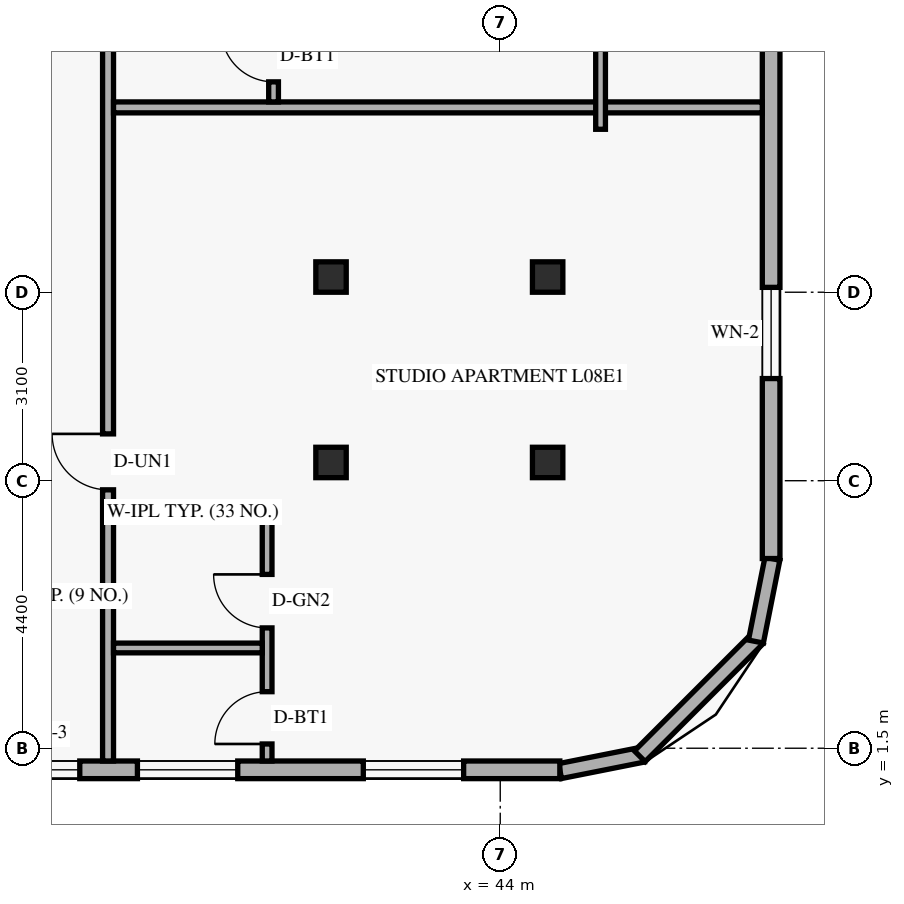
"""IFC4 building model, lengths in metres.
Left out: names, types, materials, properties, quantities, classifications, styles, units other than length and angle.
Written with IfcOpenShell. Run it as: python <this file> out.ifc"""

import sys

from ifc_helpers import new_model, si_unit, direction, frame, frame_2d, origin, origin_2d, place, context, subcontext, project, spatial, rectangle, hollow_rectangle, extrude, element, fill, save


model = new_model("IFC4")
c1 = context("Model", 3, precision=1e-05, world=origin(), true_north=direction((0.0, 1.0)))
c2 = subcontext(c1, "Body", "Model", "MODEL_VIEW")
j1 = project(units=[si_unit("LENGTHUNIT", "METRE"), si_unit("PLANEANGLEUNIT", "RADIAN")], contexts=[c1])
p1 = place(None, origin())
s1 = spatial("IfcSite", under=j1, at=p1, CompositionType="ELEMENT")
p2 = place(p1, origin())
s2 = spatial("IfcBuilding", under=s1, at=p2, CompositionType="ELEMENT")
p3 = place(p2, frame((0.0, 0.0, 34.8)))
s3 = spatial("IfcBuildingStorey", under=s2, at=p3, CompositionType="ELEMENT", Elevation=34.8)
for number, where, z_axis, x_axis in (
    (1, (41.154, 6.2, 0.0), (0.035, 0.0, 0.999), (0.0, 1.0, 0.0)),
    (2, (41.154, 9.25, 0.0), (0.035, 0.0, 0.999), (0.0, 1.0, 0.0)),
):
    element("IfcColumn", number, at=place(p3, frame(where, z_axis=z_axis, x_axis=x_axis)), inside=s3, PredefinedType="COLUMN", context=c2, shape_type="SweptSolid", body=[
        extrude(hollow_rectangle(XDim=0.5, YDim=0.5, WallThickness=0.022, at=origin_2d()), origin(), (0.0, 0.0, 1.0), 3.602),
    ])
for number, where, z_axis, x_axis in (
    (3, (44.675, 6.2, 0.0), (0.058, 0.0, 0.998), (0.0, 1.0, 0.0)),
    (4, (44.675, 9.25, 0.0), (0.058, 0.0, 0.998), (0.0, 1.0, 0.0)),
):
    element("IfcColumn", number, at=place(p3, frame(where, z_axis=z_axis, x_axis=x_axis)), inside=s3, PredefinedType="COLUMN", context=c2, shape_type="SweptSolid", body=[
        extrude(hollow_rectangle(XDim=0.5, YDim=0.5, WallThickness=0.022, at=origin_2d()), origin(), (0.0, 0.0, 1.0), 3.606),
    ])
p4 = place(p3, frame((44.983, 1.124, 0.0), z_axis=(0.0, 0.0, 1.0), x_axis=(0.980809899341, 0.19496651342, 0.0)))
e5 = element("IfcWall", 5, at=p4, inside=s3, PredefinedType="SOLIDWALL", context=c2, shape_type="SweptSolid", body=[
    extrude(rectangle(XDim=1.389, YDim=0.25, at=frame_2d((0.694, 0.0))), origin(), (0.0, 0.0, 1.0), 3.36),
])
p5 = place(p3, frame((46.295, 1.368, 0.0), z_axis=(0.0, 0.0, 1.0), x_axis=(0.707106781187, 0.707106781187, 0.0)))
e6 = element("IfcWall", 6, at=p5, inside=s3, PredefinedType="SOLIDWALL", context=c2, shape_type="SweptSolid", body=[
    extrude(rectangle(XDim=2.739, YDim=0.25, at=frame_2d((1.37, 0.0))), origin(), (0.0, 0.0, 1.0), 3.36),
])
p6 = place(p3, frame((48.205, 3.254, 0.0), z_axis=(0.0, 0.0, 1.0), x_axis=(0.19496651342, 0.980809899341, 0.0)))
e7 = element("IfcWall", 7, at=p6, inside=s3, PredefinedType="SOLIDWALL", context=c2, shape_type="SweptSolid", body=[
    extrude(rectangle(XDim=1.389, YDim=0.25, at=frame_2d((0.694, 0.0))), origin(), (0.0, 0.0, 1.0), 3.36),
])
p7 = place(p3, frame((5.42, 1.145, 0.0), z_axis=(0.0, 0.0, 1.0), x_axis=(1.0, 0.0, 0.0)))
e8 = element("IfcWall", 8, at=p7, inside=s3, PredefinedType="SOLIDWALL", context=c2, shape_type="SweptSolid", body=[
    extrude(rectangle(XDim=39.56, YDim=0.29, at=frame_2d((19.78, 0.0))), origin(), (0.0, 0.0, 1.0), 3.36),
])
p8 = place(p7, frame((2.615, 0.0, 0.85)))
e9 = element("IfcOpeningElement", 9, at=p8, cuts=e8, PredefinedType="OPENING", context=c2, shape_type="SweptSolid", body=[
    extrude(rectangle(XDim=1.65, YDim=1.6, at=frame_2d((0.825, 0.8))), frame((0.0, 0.155, 0.0), z_axis=(0.0, -1.0, 0.0), x_axis=(1.0, 0.0, 0.0)), (0.0, 0.0, 1.0), 0.31),
])
p9 = place(p7, frame((7.18, 0.0, 0.85)))
e10 = element("IfcOpeningElement", 10, at=p9, cuts=e8, PredefinedType="OPENING", context=c2, shape_type="SweptSolid", body=[
    extrude(rectangle(XDim=1.2, YDim=1.5, at=frame_2d((0.6, 0.75))), frame((0.0, 0.155, 0.0), z_axis=(0.0, -1.0, 0.0), x_axis=(1.0, 0.0, 0.0)), (0.0, 0.0, 1.0), 0.31),
])
p10 = place(p7, frame((11.906, 0.0, 0.85)))
e11 = element("IfcOpeningElement", 11, at=p10, cuts=e8, PredefinedType="OPENING", context=c2, shape_type="SweptSolid", body=[
    extrude(rectangle(XDim=1.65, YDim=1.6, at=frame_2d((0.825, 0.8))), frame((0.0, 0.155, 0.0), z_axis=(0.0, -1.0, 0.0), x_axis=(1.0, 0.0, 0.0)), (0.0, 0.0, 1.0), 0.31),
])
p11 = place(p7, frame((18.515, 0.0, 0.85)))
e12 = element("IfcOpeningElement", 12, at=p11, cuts=e8, PredefinedType="OPENING", context=c2, shape_type="SweptSolid", body=[
    extrude(rectangle(XDim=1.65, YDim=1.6, at=frame_2d((0.825, 0.8))), frame((0.0, 0.155, 0.0), z_axis=(0.0, -1.0, 0.0), x_axis=(1.0, 0.0, 0.0)), (0.0, 0.0, 1.0), 0.31),
])
p12 = place(p7, frame((25.124, 0.0, 0.85)))
e13 = element("IfcOpeningElement", 13, at=p12, cuts=e8, PredefinedType="OPENING", context=c2, shape_type="SweptSolid", body=[
    extrude(rectangle(XDim=1.65, YDim=1.6, at=frame_2d((0.825, 0.8))), frame((0.0, 0.155, 0.0), z_axis=(0.0, -1.0, 0.0), x_axis=(1.0, 0.0, 0.0)), (0.0, 0.0, 1.0), 0.31),
])
p13 = place(p7, frame((30.465, 0.0, 0.85)))
e14 = element("IfcOpeningElement", 14, at=p13, cuts=e8, PredefinedType="OPENING", context=c2, shape_type="SweptSolid", body=[
    extrude(rectangle(XDim=1.2, YDim=1.5, at=frame_2d((0.6, 0.75))), frame((0.0, 0.155, 0.0), z_axis=(0.0, -1.0, 0.0), x_axis=(1.0, 0.0, 0.0)), (0.0, 0.0, 1.0), 0.31),
])
p14 = place(p7, frame((32.613, 0.0, 0.85)))
e15 = element("IfcOpeningElement", 15, at=p14, cuts=e8, PredefinedType="OPENING", context=c2, shape_type="SweptSolid", body=[
    extrude(rectangle(XDim=1.65, YDim=1.6, at=frame_2d((0.825, 0.8))), frame((0.0, 0.155, 0.0), z_axis=(0.0, -1.0, 0.0), x_axis=(1.0, 0.0, 0.0)), (0.0, 0.0, 1.0), 0.31),
])
p15 = place(p7, frame((36.328, 0.0, 0.85)))
e16 = element("IfcOpeningElement", 16, at=p15, cuts=e8, PredefinedType="OPENING", context=c2, shape_type="SweptSolid", body=[
    extrude(rectangle(XDim=1.65, YDim=1.6, at=frame_2d((0.825, 0.8))), frame((0.0, 0.155, 0.0), z_axis=(0.0, -1.0, 0.0), x_axis=(1.0, 0.0, 0.0)), (0.0, 0.0, 1.0), 0.31),
])
p16 = place(p3, frame((48.455, 4.62, 0.0), z_axis=(0.0, 0.0, 1.0), x_axis=(0.0, 1.0, 0.0)))
e17 = element("IfcWall", 17, at=p16, inside=s3, PredefinedType="SOLIDWALL", context=c2, shape_type="SweptSolid", body=[
    extrude(rectangle(XDim=20.55, YDim=0.29, at=frame_2d((10.275, 0.0))), origin(), (0.0, 0.0, 1.0), 3.36),
])
p17 = place(p16, frame((2.96, 0.0, 0.85)))
e18 = element("IfcOpeningElement", 18, at=p17, cuts=e17, PredefinedType="OPENING", context=c2, shape_type="SweptSolid", body=[
    extrude(rectangle(XDim=1.5, YDim=1.55, at=frame_2d((0.75, 0.775))), frame((0.0, 0.155, 0.0), z_axis=(0.0, -1.0, 0.0), x_axis=(1.0, 0.0, 0.0)), (0.0, 0.0, 1.0), 0.31),
])
p18 = place(p16, frame((11.29, 0.0, 0.85)))
e19 = element("IfcOpeningElement", 19, at=p18, cuts=e17, PredefinedType="OPENING", context=c2, shape_type="SweptSolid", body=[
    extrude(rectangle(XDim=1.5, YDim=1.55, at=frame_2d((0.75, 0.775))), frame((0.0, 0.155, 0.0), z_axis=(0.0, -1.0, 0.0), x_axis=(1.0, 0.0, 0.0)), (0.0, 0.0, 1.0), 0.31),
])
p19 = place(p16, frame((17.855, 0.0, 0.85)))
e20 = element("IfcOpeningElement", 20, at=p19, cuts=e17, PredefinedType="OPENING", context=c2, shape_type="SweptSolid", body=[
    extrude(rectangle(XDim=1.5, YDim=1.55, at=frame_2d((0.75, 0.775))), frame((0.0, 0.155, 0.0), z_axis=(0.0, -1.0, 0.0), x_axis=(1.0, 0.0, 0.0)), (0.0, 0.0, 1.0), 0.31),
])
p20 = place(p3, frame((37.55, 1.29, 0.0), z_axis=(0.0, 0.0, 1.0), x_axis=(0.0, 1.0, 0.0)))
e21 = element("IfcWall", 21, at=p20, inside=s3, PredefinedType="STANDARD", context=c2, shape_type="SweptSolid", body=[
    extrude(rectangle(XDim=45.42, YDim=0.18, at=frame_2d((22.71, 0.0))), origin(), (0.0, 0.0, 1.0), 2.649),
])
p21 = place(p20, frame((4.46, 0.0, 0.0)))
e22 = element("IfcOpeningElement", 22, at=p21, cuts=e21, PredefinedType="OPENING", context=c2, shape_type="SweptSolid", body=[
    extrude(rectangle(XDim=0.92, YDim=2.15, at=frame_2d((0.46, 1.075))), frame((0.0, 0.1, 0.0), z_axis=(0.0, -1.0, 0.0), x_axis=(1.0, 0.0, 0.0)), (0.0, 0.0, 1.0), 0.2),
])
p22 = place(p20, frame((15.907, 0.0, 0.0)))
e23 = element("IfcOpeningElement", 23, at=p22, cuts=e21, PredefinedType="OPENING", context=c2, shape_type="SweptSolid", body=[
    extrude(rectangle(XDim=0.92, YDim=2.15, at=frame_2d((0.46, 1.075))), frame((0.0, 0.1, 0.0), z_axis=(0.0, -1.0, 0.0), x_axis=(1.0, 0.0, 0.0)), (0.0, 0.0, 1.0), 0.2),
])
p23 = place(p20, frame((28.23, 0.0, 0.0)))
e24 = element("IfcOpeningElement", 24, at=p23, cuts=e21, PredefinedType="OPENING", context=c2, shape_type="SweptSolid", body=[
    extrude(rectangle(XDim=0.92, YDim=2.15, at=frame_2d((0.46, 1.075))), frame((0.0, 0.1, 0.0), z_axis=(0.0, -1.0, 0.0), x_axis=(1.0, 0.0, 0.0)), (0.0, 0.0, 1.0), 0.2),
])
p24 = place(p20, frame((40.02, 0.0, 0.0)))
e25 = element("IfcOpeningElement", 25, at=p24, cuts=e21, PredefinedType="OPENING", context=c2, shape_type="SweptSolid", body=[
    extrude(rectangle(XDim=0.92, YDim=2.15, at=frame_2d((0.46, 1.075))), frame((0.0, 0.1, 0.0), z_axis=(0.0, -1.0, 0.0), x_axis=(1.0, 0.0, 0.0)), (0.0, 0.0, 1.0), 0.2),
])
p25 = place(p3, frame((37.64, 5.39, 0.0), z_axis=(0.0, 0.0, 1.0), x_axis=(1.0, 0.0, 0.0)))
e26 = element("IfcWall", 26, at=p25, inside=s3, PredefinedType="PLUMBINGWALL", context=c2, shape_type="SweptSolid", body=[
    extrude(rectangle(XDim=2.606, YDim=0.16, at=frame_2d((1.303, 0.0))), origin(), (0.0, 0.0, 1.0), 3.36),
])
p26 = place(p3, frame((40.166, 1.29, 0.0), z_axis=(0.0, 0.0, 1.0), x_axis=(0.0, 1.0, 0.0)))
e27 = element("IfcWall", 27, at=p26, inside=s3, PredefinedType="PLUMBINGWALL", context=c2, shape_type="SweptSolid", body=[
    extrude(rectangle(XDim=4.19, YDim=0.16, at=frame_2d((2.095, 0.0))), origin(), (0.0, 0.0, 1.0), 3.36),
])
p27 = place(p26, frame((0.28, 0.0, 0.0)))
e28 = element("IfcOpeningElement", 28, at=p27, cuts=e27, PredefinedType="OPENING", context=c2, shape_type="SweptSolid", body=[
    extrude(rectangle(XDim=0.86, YDim=2.12, at=frame_2d((0.43, 1.06))), frame((0.0, 0.09, 0.0), z_axis=(0.0, -1.0, 0.0), x_axis=(1.0, 0.0, 0.0)), (0.0, 0.0, 1.0), 0.18),
])
p28 = place(p26, frame((2.189, 0.0, 0.0)))
e29 = element("IfcOpeningElement", 29, at=p28, cuts=e27, PredefinedType="OPENING", context=c2, shape_type="SweptSolid", body=[
    extrude(rectangle(XDim=0.88, YDim=2.12, at=frame_2d((0.44, 1.06))), frame((0.0, 0.09, 0.0), z_axis=(0.0, -1.0, 0.0), x_axis=(1.0, 0.0, 0.0)), (0.0, 0.0, 1.0), 0.18),
])
p29 = place(p3, frame((37.64, 3.149, 0.0), z_axis=(0.0, 0.0, 1.0), x_axis=(1.0, 0.0, 0.0)))
e30 = element("IfcWall", 30, at=p29, inside=s3, PredefinedType="PLUMBINGWALL", context=c2, shape_type="SweptSolid", body=[
    extrude(rectangle(XDim=2.446, YDim=0.16, at=frame_2d((1.223, 0.0))), origin(), (0.0, 0.0, 1.0), 3.36),
])
p30 = place(p3, frame((37.64, 12.04, 0.0), z_axis=(0.0, 0.0, 1.0), x_axis=(1.0, 0.0, 0.0)))
e31 = element("IfcWall", 31, at=p30, inside=s3, PredefinedType="PARTITIONING", context=c2, shape_type="SweptSolid", body=[
    extrude(rectangle(XDim=10.67, YDim=0.18, at=frame_2d((5.335, 0.0))), origin(), (0.0, 0.0, 1.0), 2.649),
])
p31 = place(p3, frame((40.272, 12.13, 0.0), z_axis=(0.0, 0.0, 1.0), x_axis=(0.0, 1.0, 0.0)))
e32 = element("IfcWall", 32, at=p31, inside=s3, PredefinedType="PLUMBINGWALL", context=c2, shape_type="SweptSolid", body=[
    extrude(rectangle(XDim=4.797, YDim=0.16, at=frame_2d((2.398, 0.0))), origin(), (0.0, 0.0, 1.0), 2.932),
])
p32 = place(p31, frame((0.33, 0.0, 0.0)))
e33 = element("IfcOpeningElement", 33, at=p32, cuts=e32, PredefinedType="OPENING", context=c2, shape_type="SweptSolid", body=[
    extrude(rectangle(XDim=0.86, YDim=2.12, at=frame_2d((0.43, 1.06))), frame((0.0, 0.09, 0.0), z_axis=(0.0, -1.0, 0.0), x_axis=(1.0, 0.0, 0.0)), (0.0, 0.0, 1.0), 0.18),
])
p33 = place(p31, frame((2.495, 0.0, 0.0)))
e34 = element("IfcOpeningElement", 34, at=p33, cuts=e32, PredefinedType="OPENING", context=c2, shape_type="SweptSolid", body=[
    extrude(rectangle(XDim=0.88, YDim=2.12, at=frame_2d((0.44, 1.06))), frame((0.0, 0.09, 0.0), z_axis=(0.0, -1.0, 0.0), x_axis=(1.0, 0.0, 0.0)), (0.0, 0.0, 1.0), 0.18),
])
p34 = place(p3, frame((45.65, 11.68, 0.0), z_axis=(0.0, 0.0, 1.0), x_axis=(0.0, 1.0, 0.0)))
e35 = element("IfcWall", 35, at=p34, inside=s3, PredefinedType="PARTITIONING", context=c2, shape_type="SweptSolid", body=[
    extrude(rectangle(XDim=9.68, YDim=0.16, at=frame_2d((4.84, 0.0))), origin(), (0.0, 0.0, 1.0), 3.36),
])
p35 = place(p34, frame((4.08, 0.0, 0.0)))
e36 = element("IfcOpeningElement", 36, at=p35, cuts=e35, PredefinedType="OPENING", context=c2, shape_type="SweptSolid", body=[
    extrude(rectangle(XDim=0.95, YDim=2.15, at=frame_2d((0.475, 1.075))), frame((0.0, 0.09, 0.0), z_axis=(0.0, -1.0, 0.0), x_axis=(1.0, 0.0, 0.0)), (0.0, 0.0, 1.0), 0.18),
])
p36 = place(p13, origin())
e37 = element("IfcWindow", 37, at=p36, inside=s3, PartitioningType="SINGLE_PANEL", PredefinedType="WINDOW", context=c2, shape_type="SweptSolid", body=[
    extrude(rectangle(XDim=1.2, YDim=1.5, at=frame_2d((0.6, 0.75))), frame((0.0, 0.03, 0.0), z_axis=(0.0, -1.0, 0.0), x_axis=(1.0, 0.0, 0.0)), (0.0, 0.0, 1.0), 0.06),
])
fill(e14, e37)
p37 = place(p14, origin())
e38 = element("IfcWindow", 38, at=p37, inside=s3, PartitioningType="SINGLE_PANEL", PredefinedType="WINDOW", context=c2, shape_type="SweptSolid", body=[
    extrude(rectangle(XDim=1.65, YDim=1.6, at=frame_2d((0.825, 0.8))), frame((0.0, 0.03, 0.0), z_axis=(0.0, -1.0, 0.0), x_axis=(1.0, 0.0, 0.0)), (0.0, 0.0, 1.0), 0.06),
])
fill(e15, e38)
p38 = place(p15, origin())
e39 = element("IfcWindow", 39, at=p38, inside=s3, PartitioningType="SINGLE_PANEL", PredefinedType="WINDOW", context=c2, shape_type="SweptSolid", body=[
    extrude(rectangle(XDim=1.65, YDim=1.6, at=frame_2d((0.825, 0.8))), frame((0.0, 0.03, 0.0), z_axis=(0.0, -1.0, 0.0), x_axis=(1.0, 0.0, 0.0)), (0.0, 0.0, 1.0), 0.06),
])
fill(e16, e39)
p39 = place(p17, origin())
e40 = element("IfcWindow", 40, at=p39, inside=s3, PartitioningType="SINGLE_PANEL", PredefinedType="WINDOW", context=c2, shape_type="SweptSolid", body=[
    extrude(rectangle(XDim=1.5, YDim=1.55, at=frame_2d((0.75, 0.775))), frame((0.0, 0.03, 0.0), z_axis=(0.0, -1.0, 0.0), x_axis=(1.0, 0.0, 0.0)), (0.0, 0.0, 1.0), 0.06),
])
fill(e18, e40)
p40 = place(p21, origin())
e41 = element("IfcDoor", 41, at=p40, inside=s3, OperationType="SINGLE_SWING_RIGHT", PredefinedType="DOOR", context=c2, shape_type="SweptSolid", body=[
    extrude(rectangle(XDim=0.92, YDim=2.15, at=frame_2d((0.46, 1.075))), frame((0.0, 0.025, 0.0), z_axis=(0.0, -1.0, 0.0), x_axis=(1.0, 0.0, 0.0)), (0.0, 0.0, 1.0), 0.05),
])
fill(e22, e41)
p41 = place(p27, origin())
e42 = element("IfcDoor", 42, at=p41, inside=s3, OperationType="SINGLE_SWING_LEFT", PredefinedType="DOOR", context=c2, shape_type="SweptSolid", body=[
    extrude(rectangle(XDim=0.86, YDim=2.12, at=frame_2d((0.43, 1.06))), frame((0.0, 0.025, 0.0), z_axis=(0.0, -1.0, 0.0), x_axis=(1.0, 0.0, 0.0)), (0.0, 0.0, 1.0), 0.05),
])
fill(e28, e42)
p42 = place(p28, origin())
e43 = element("IfcDoor", 43, at=p42, inside=s3, OperationType="SINGLE_SWING_RIGHT", PredefinedType="DOOR", context=c2, shape_type="SweptSolid", body=[
    extrude(rectangle(XDim=0.88, YDim=2.12, at=frame_2d((0.44, 1.06))), frame((0.0, 0.025, 0.0), z_axis=(0.0, -1.0, 0.0), x_axis=(1.0, 0.0, 0.0)), (0.0, 0.0, 1.0), 0.05),
])
fill(e29, e43)
p43 = place(p32, origin())
e44 = element("IfcDoor", 44, at=p43, inside=s3, OperationType="SINGLE_SWING_RIGHT", PredefinedType="DOOR", context=c2, shape_type="SweptSolid", body=[
    extrude(rectangle(XDim=0.86, YDim=2.12, at=frame_2d((0.43, 1.06))), frame((0.0, 0.025, 0.0), z_axis=(0.0, -1.0, 0.0), x_axis=(1.0, 0.0, 0.0)), (0.0, 0.0, 1.0), 0.05),
])
fill(e33, e44)
save(model, sys.argv[1])
